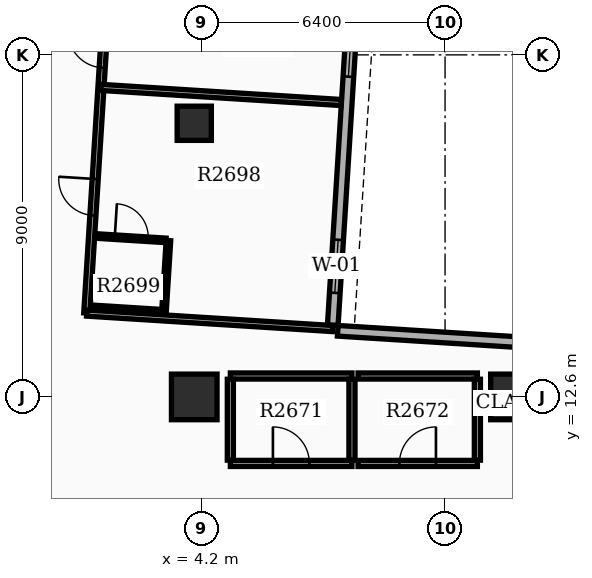
"""IFC4 building model, lengths in metres.
Left out: names, types, materials, properties, quantities, classifications, styles, units other than length and angle.
Written with IfcOpenShell. Run it as: python <this file> out.ifc"""

import sys

from ifc_helpers import new_model, si_unit, direction, frame, frame_2d, origin, origin_2d, place, context, subcontext, project, spatial, rectangle, extrude, element, fill, save


model = new_model("IFC4")
c1 = context("Model", 3, precision=1e-05, world=origin(), true_north=direction((0.0, 1.0)))
c2 = subcontext(c1, "Body", "Model", "MODEL_VIEW")
j1 = project(units=[si_unit("LENGTHUNIT", "METRE"), si_unit("PLANEANGLEUNIT", "RADIAN")], contexts=[c1])
p1 = place(None, origin())
s1 = spatial("IfcSite", under=j1, at=p1, CompositionType="ELEMENT")
p2 = place(p1, origin())
s2 = spatial("IfcBuilding", under=s1, at=p2, CompositionType="ELEMENT")
p3 = place(p2, frame((0.0, 0.0, 168.3)))
s3 = spatial("IfcBuildingStorey", under=s2, at=p3, CompositionType="ELEMENT", Elevation=168.3)
for number, where, z_axis, x_axis in (
    (1, (12.4, 12.6, 0.0), (0.0, 0.0, 1.0), (1.0, 0.0, 0.0)),
    (2, (4.0, 12.6, 0.0), (0.0, 0.0, 1.0), (1.0, 0.0, 0.0)),
):
    element("IfcColumn", number, at=place(p3, frame(where, z_axis=z_axis, x_axis=x_axis)), inside=s3, PredefinedType="COLUMN", context=c2, shape_type="SweptSolid", body=[
        extrude(rectangle(XDim=1.2, YDim=1.2, at=origin_2d()), origin(), (0.0, 0.0, 1.0), 3.9),
    ])
p4 = place(p3, frame((4.0, 19.8, 0.0), z_axis=(0.0, 0.0, 1.0), x_axis=(1.0, 0.0, 0.0)))
e3 = element("IfcColumn", 3, at=p4, inside=s3, PredefinedType="COLUMN", context=c2, shape_type="SweptSolid", body=[
    extrude(rectangle(XDim=0.9, YDim=0.9, at=origin_2d()), origin(), (0.0, 0.0, 1.0), 3.9),
])
p5 = place(p3, frame((7.645, 14.489, 0.0), z_axis=(0.0, 0.0, 1.0), x_axis=(0.06279645424, 0.99802635503, 0.0)))
e4 = element("IfcWall", 4, at=p5, inside=s3, PredefinedType="STANDARD", context=c2, shape_type="SweptSolid", body=[
    extrude(rectangle(XDim=20.1, YDim=0.28, at=frame_2d((10.05, 0.0))), origin(), (0.0, 0.0, 1.0), 2.97),
])
p6 = place(p5, frame((0.85, 0.0, 0.8)))
e5 = element("IfcOpeningElement", 5, at=p6, cuts=e4, PredefinedType="OPENING", context=c2, shape_type="SweptSolid", body=[
    extrude(rectangle(XDim=1.4, YDim=1.6, at=frame_2d((0.7, 0.8))), frame((0.0, 0.15, 0.0), z_axis=(0.0, -1.0, 0.0), x_axis=(1.0, 0.0, 0.0)), (0.0, 0.0, 1.0), 0.3),
])
p7 = place(p5, frame((6.55, 0.0, 0.8)))
e6 = element("IfcOpeningElement", 6, at=p7, cuts=e4, PredefinedType="OPENING", context=c2, shape_type="SweptSolid", body=[
    extrude(rectangle(XDim=1.4, YDim=1.6, at=frame_2d((0.7, 0.8))), frame((0.0, 0.15, 0.0), z_axis=(0.0, -1.0, 0.0), x_axis=(1.0, 0.0, 0.0)), (0.0, 0.0, 1.0), 0.3),
])
p8 = place(p5, frame((10.25, 0.0, 0.8)))
e7 = element("IfcOpeningElement", 7, at=p8, cuts=e4, PredefinedType="OPENING", context=c2, shape_type="SweptSolid", body=[
    extrude(rectangle(XDim=1.4, YDim=1.6, at=frame_2d((0.7, 0.8))), frame((0.0, 0.15, 0.0), z_axis=(0.0, -1.0, 0.0), x_axis=(1.0, 0.0, 0.0)), (0.0, 0.0, 1.0), 0.3),
])
p9 = place(p5, frame((13.45, 0.0, 0.8)))
e8 = element("IfcOpeningElement", 8, at=p9, cuts=e4, PredefinedType="OPENING", context=c2, shape_type="SweptSolid", body=[
    extrude(rectangle(XDim=1.4, YDim=1.6, at=frame_2d((0.7, 0.8))), frame((0.0, 0.15, 0.0), z_axis=(0.0, -1.0, 0.0), x_axis=(1.0, 0.0, 0.0)), (0.0, 0.0, 1.0), 0.3),
])
p10 = place(p3, frame((14.063, 13.945, 0.0), z_axis=(0.0, 0.0, 1.0), x_axis=(-0.998027314704, 0.062781200242, 0.0)))
e9 = element("IfcWall", 9, at=p10, inside=s3, PredefinedType="STANDARD", context=c2, shape_type="SweptSolid", body=[
    extrude(rectangle(XDim=6.3, YDim=0.28, at=frame_2d((3.15, 0.0))), origin(), (0.0, 0.0, 1.0), 2.97),
])
p11 = place(p3, frame((4.95, 10.85, 0.0), z_axis=(0.0, 0.0, 1.0), x_axis=(1.0, 0.0, 0.0)))
e10 = element("IfcWall", 10, at=p11, inside=s3, PredefinedType="PARTITIONING", context=c2, shape_type="SweptSolid", body=[
    extrude(rectangle(XDim=3.2, YDim=0.16, at=frame_2d((1.6, 0.0))), origin(), (0.0, 0.0, 1.0), 2.96),
])
p12 = place(p11, frame((1.12, 0.0, 0.0)))
e11 = element("IfcOpeningElement", 11, at=p12, cuts=e10, PredefinedType="OPENING", context=c2, shape_type="SweptSolid", body=[
    extrude(rectangle(XDim=0.96, YDim=2.15, at=frame_2d((0.48, 1.075))), frame((0.0, 0.09, 0.0), z_axis=(0.0, -1.0, 0.0), x_axis=(1.0, 0.0, 0.0)), (0.0, 0.0, 1.0), 0.18),
])
p13 = place(p3, frame((4.95, 13.15, 0.0), z_axis=(0.0, 0.0, 1.0), x_axis=(1.0, 0.0, 0.0)))
e12 = element("IfcWall", 12, at=p13, inside=s3, PredefinedType="PARTITIONING", context=c2, shape_type="SweptSolid", body=[
    extrude(rectangle(XDim=3.2, YDim=0.16, at=frame_2d((1.6, 0.0))), origin(), (0.0, 0.0, 1.0), 2.96),
])
for number, where, z_axis, x_axis in (
    (13, (4.95, 10.935, 0.0), (0.0, 0.0, 1.0), (0.0, 1.0, 0.0)),
    (14, (8.15, 10.935, 0.0), (0.0, 0.0, 1.0), (0.0, 1.0, 0.0)),
):
    element("IfcWall", number, at=place(p3, frame(where, z_axis=z_axis, x_axis=x_axis)), inside=s3, PredefinedType="PARTITIONING", context=c2, shape_type="SweptSolid", body=[
        extrude(rectangle(XDim=2.13, YDim=0.16, at=frame_2d((1.065, 0.0))), origin(), (0.0, 0.0, 1.0), 2.96),
    ])
p14 = place(p3, frame((8.31, 10.85, 0.0), z_axis=(0.0, 0.0, 1.0), x_axis=(1.0, 0.0, 0.0)))
e15 = element("IfcWall", 15, at=p14, inside=s3, PredefinedType="PARTITIONING", context=c2, shape_type="SweptSolid", body=[
    extrude(rectangle(XDim=3.14, YDim=0.16, at=frame_2d((1.57, 0.0))), origin(), (0.0, 0.0, 1.0), 2.96),
])
p15 = place(p14, frame((1.09, 0.0, 0.0)))
e16 = element("IfcOpeningElement", 16, at=p15, cuts=e15, PredefinedType="OPENING", context=c2, shape_type="SweptSolid", body=[
    extrude(rectangle(XDim=0.96, YDim=2.15, at=frame_2d((0.48, 1.075))), frame((0.0, 0.09, 0.0), z_axis=(0.0, -1.0, 0.0), x_axis=(1.0, 0.0, 0.0)), (0.0, 0.0, 1.0), 0.18),
])
p16 = place(p3, frame((8.31, 13.15, 0.0), z_axis=(0.0, 0.0, 1.0), x_axis=(1.0, 0.0, 0.0)))
e17 = element("IfcWall", 17, at=p16, inside=s3, PredefinedType="PARTITIONING", context=c2, shape_type="SweptSolid", body=[
    extrude(rectangle(XDim=3.14, YDim=0.16, at=frame_2d((1.57, 0.0))), origin(), (0.0, 0.0, 1.0), 2.96),
])
p17 = place(p3, frame((11.45, 10.935, 0.0), z_axis=(0.0, 0.0, 1.0), x_axis=(0.0, 1.0, 0.0)))
e18 = element("IfcWall", 18, at=p17, inside=s3, PredefinedType="PARTITIONING", context=c2, shape_type="SweptSolid", body=[
    extrude(rectangle(XDim=2.13, YDim=0.16, at=frame_2d((1.065, 0.0))), origin(), (0.0, 0.0, 1.0), 2.96),
])
p18 = place(p3, frame((1.172, 14.806, 0.0), z_axis=(0.0, 0.0, 1.0), x_axis=(0.062771584278, 0.998027919553, 0.0)))
e19 = element("IfcWall", 19, at=p18, inside=s3, PredefinedType="PARTITIONING", context=c2, shape_type="SweptSolid", body=[
    extrude(rectangle(XDim=9.7, YDim=0.16, at=frame_2d((4.85, 0.0))), origin(), (0.0, 0.0, 1.0), 2.96),
])
p19 = place(p18, frame((2.575, 0.0, 0.0)))
e20 = element("IfcOpeningElement", 20, at=p19, cuts=e19, PredefinedType="OPENING", context=c2, shape_type="SweptSolid", body=[
    extrude(rectangle(XDim=0.96, YDim=2.15, at=frame_2d((0.48, 1.075))), frame((0.0, 0.09, 0.0), z_axis=(0.0, -1.0, 0.0), x_axis=(1.0, 0.0, 0.0)), (0.0, 0.0, 1.0), 0.18),
])
p20 = place(p18, frame((6.467, 0.0, 0.0)))
e21 = element("IfcOpeningElement", 21, at=p20, cuts=e19, PredefinedType="OPENING", context=c2, shape_type="SweptSolid", body=[
    extrude(rectangle(XDim=0.96, YDim=2.15, at=frame_2d((0.48, 1.075))), frame((0.0, 0.09, 0.0), z_axis=(0.0, -1.0, 0.0), x_axis=(1.0, 0.0, 0.0)), (0.0, 0.0, 1.0), 0.18),
])
p21 = place(p3, frame((1.172, 14.806, 0.0), z_axis=(0.0, 0.0, 1.0), x_axis=(0.998025657815, -0.06280753413, 0.0)))
e22 = element("IfcWall", 22, at=p21, inside=s3, PredefinedType="PARTITIONING", context=c2, shape_type="SweptSolid", body=[
    extrude(rectangle(XDim=6.48, YDim=0.16, at=frame_2d((3.24, 0.0))), origin(), (0.0, 0.0, 1.0), 2.96),
])
p22 = place(p3, frame((1.546, 20.744, 0.0), z_axis=(0.0, 0.0, 1.0), x_axis=(0.998025479614, -0.06281036572, 0.0)))
e23 = element("IfcWall", 23, at=p22, inside=s3, PredefinedType="PARTITIONING", context=c2, shape_type="SweptSolid", body=[
    extrude(rectangle(XDim=6.332, YDim=0.16, at=frame_2d((3.166, 0.0))), origin(), (0.0, 0.0, 1.0), 2.96),
])
p23 = place(p3, frame((1.44, 16.833, 0.0), z_axis=(0.0, 0.0, 1.0), x_axis=(0.998027443946, -0.062779145668, 0.0)))
e24 = element("IfcWall", 24, at=p23, inside=s3, PredefinedType="PARTITIONING", context=c2, shape_type="SweptSolid", body=[
    extrude(rectangle(XDim=1.82, YDim=0.12, at=frame_2d((0.91, 0.0))), origin(), (0.0, 0.0, 1.0), 2.96),
])
p24 = place(p23, frame((0.47, 0.0, 0.0)))
e25 = element("IfcOpeningElement", 25, at=p24, cuts=e24, PredefinedType="OPENING", context=c2, shape_type="SweptSolid", body=[
    extrude(rectangle(XDim=0.88, YDim=2.1, at=frame_2d((0.44, 1.05))), frame((0.0, 0.07, 0.0), z_axis=(0.0, -1.0, 0.0), x_axis=(1.0, 0.0, 0.0)), (0.0, 0.0, 1.0), 0.14),
])
p25 = place(p3, frame((1.322, 14.957, 0.0), z_axis=(0.0, 0.0, 1.0), x_axis=(0.998027443946, -0.062779145668, 0.0)))
e26 = element("IfcWall", 26, at=p25, inside=s3, PredefinedType="PARTITIONING", context=c2, shape_type="SweptSolid", body=[
    extrude(rectangle(XDim=1.82, YDim=0.12, at=frame_2d((0.91, 0.0))), origin(), (0.0, 0.0, 1.0), 2.96),
])
p26 = place(p3, frame((3.203, 14.838, 0.0), z_axis=(0.0, 0.0, 1.0), x_axis=(0.062847152131, 0.998023163794, 0.0)))
e27 = element("IfcWall", 27, at=p26, inside=s3, PredefinedType="PARTITIONING", context=c2, shape_type="SweptSolid", body=[
    extrude(rectangle(XDim=1.88, YDim=0.12, at=frame_2d((0.94, 0.0))), origin(), (0.0, 0.0, 1.0), 2.96),
])
p27 = place(p6, origin())
e28 = element("IfcWindow", 28, at=p27, inside=s3, PartitioningType="SINGLE_PANEL", PredefinedType="WINDOW", context=c2, shape_type="SweptSolid", body=[
    extrude(rectangle(XDim=1.4, YDim=1.6, at=frame_2d((0.7, 0.8))), frame((0.0, 0.03, 0.0), z_axis=(0.0, -1.0, 0.0), x_axis=(1.0, 0.0, 0.0)), (0.0, 0.0, 1.0), 0.06),
])
fill(e5, e28)
p28 = place(p7, origin())
e29 = element("IfcWindow", 29, at=p28, inside=s3, PartitioningType="SINGLE_PANEL", PredefinedType="WINDOW", context=c2, shape_type="SweptSolid", body=[
    extrude(rectangle(XDim=1.4, YDim=1.6, at=frame_2d((0.7, 0.8))), frame((0.0, 0.03, 0.0), z_axis=(0.0, -1.0, 0.0), x_axis=(1.0, 0.0, 0.0)), (0.0, 0.0, 1.0), 0.06),
])
fill(e6, e29)
p29 = place(p12, origin())
e30 = element("IfcDoor", 30, at=p29, inside=s3, OperationType="SINGLE_SWING_LEFT", PredefinedType="DOOR", context=c2, shape_type="SweptSolid", body=[
    extrude(rectangle(XDim=0.96, YDim=2.15, at=frame_2d((0.48, 1.075))), frame((0.0, 0.025, 0.0), z_axis=(0.0, -1.0, 0.0), x_axis=(1.0, 0.0, 0.0)), (0.0, 0.0, 1.0), 0.05),
])
fill(e11, e30)
p30 = place(p15, origin())
e31 = element("IfcDoor", 31, at=p30, inside=s3, OperationType="SINGLE_SWING_RIGHT", PredefinedType="DOOR", context=c2, shape_type="SweptSolid", body=[
    extrude(rectangle(XDim=0.96, YDim=2.15, at=frame_2d((0.48, 1.075))), frame((0.0, 0.025, 0.0), z_axis=(0.0, -1.0, 0.0), x_axis=(1.0, 0.0, 0.0)), (0.0, 0.0, 1.0), 0.05),
])
fill(e16, e31)
p31 = place(p19, origin())
e32 = element("IfcDoor", 32, at=p31, inside=s3, OperationType="SINGLE_SWING_RIGHT", PredefinedType="DOOR", context=c2, shape_type="SweptSolid", body=[
    extrude(rectangle(XDim=0.96, YDim=2.15, at=frame_2d((0.48, 1.075))), frame((0.0, 0.025, 0.0), z_axis=(0.0, -1.0, 0.0), x_axis=(1.0, 0.0, 0.0)), (0.0, 0.0, 1.0), 0.05),
])
fill(e20, e32)
p32 = place(p24, origin())
e33 = element("IfcDoor", 33, at=p32, inside=s3, OperationType="SINGLE_SWING_LEFT", PredefinedType="DOOR", context=c2, shape_type="SweptSolid", body=[
    extrude(rectangle(XDim=0.88, YDim=2.1, at=frame_2d((0.44, 1.05))), frame((0.0, 0.025, 0.0), z_axis=(0.0, -1.0, 0.0), x_axis=(1.0, 0.0, 0.0)), (0.0, 0.0, 1.0), 0.05),
])
fill(e25, e33)
p33 = place(p20, origin())
e34 = element("IfcDoor", 34, at=p33, inside=s3, OperationType="SINGLE_SWING_RIGHT", PredefinedType="DOOR", context=c2, shape_type="SweptSolid", body=[
    extrude(rectangle(XDim=0.96, YDim=2.15, at=frame_2d((0.48, 1.075))), frame((0.0, 0.025, 0.0), z_axis=(0.0, -1.0, 0.0), x_axis=(1.0, 0.0, 0.0)), (0.0, 0.0, 1.0), 0.05),
])
fill(e21, e34)
save(model, sys.argv[1])
